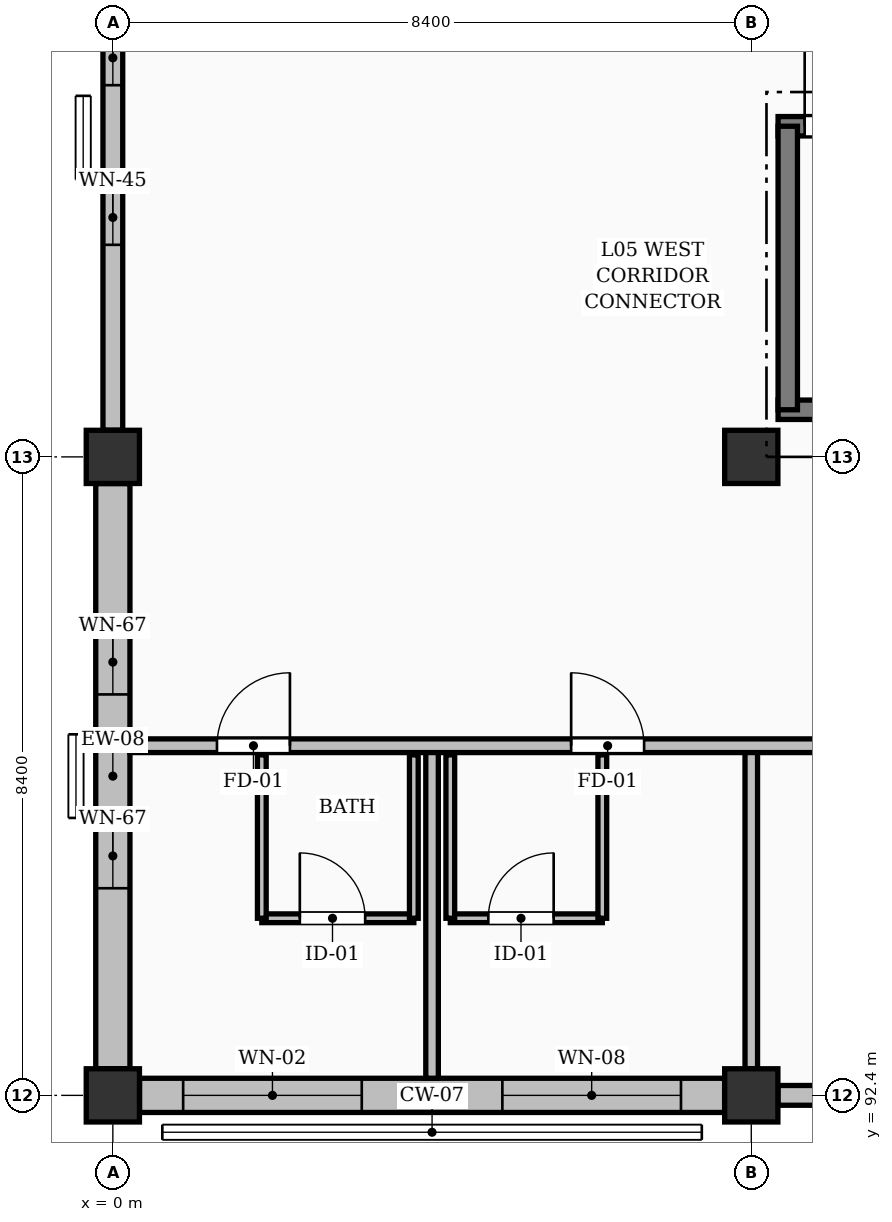
"""IFC4 building model, lengths in metres.
Left out: names, types, materials, properties, quantities, classifications, styles, units other than length and angle.
Written with IfcOpenShell. Run it as: python <this file> out.ifc"""

import sys

from ifc_helpers import new_model, si_unit, direction, frame, frame_2d, origin, origin_2d, place, context, subcontext, project, spatial, rectangle, extrude, element, fill, save


model = new_model("IFC4")
c1 = context("Model", 3, precision=1e-05, world=origin(), true_north=direction((0.0, 1.0)))
c2 = subcontext(c1, "Body", "Model", "MODEL_VIEW")
j1 = project(units=[si_unit("LENGTHUNIT", "METRE"), si_unit("PLANEANGLEUNIT", "RADIAN")], contexts=[c1])
p1 = place(None, origin())
s1 = spatial("IfcSite", under=j1, at=p1, CompositionType="ELEMENT")
p2 = place(p1, origin())
s2 = spatial("IfcBuilding", under=s1, at=p2, CompositionType="ELEMENT")
p3 = place(p2, frame((0.0, 0.0, 18.48)))
s3 = spatial("IfcBuildingStorey", under=s2, at=p3, CompositionType="ELEMENT", Elevation=18.48)
for number, where, z_axis, x_axis in (
    (1, (0.0, 92.4, 0.0), (0.0, 0.0, 1.0), (1.0, 0.0, 0.0)),
    (2, (0.0, 100.8, 0.0), (0.0, 0.0, 1.0), (1.0, 0.0, 0.0)),
    (3, (8.4, 92.4, 0.0), (0.0, 0.0, 1.0), (1.0, 0.0, 0.0)),
    (4, (8.4, 100.8, 0.0), (0.0, 0.0, 1.0), (1.0, 0.0, 0.0)),
):
    element("IfcColumn", number, at=place(p3, frame(where, z_axis=z_axis, x_axis=x_axis)), inside=s3, PredefinedType="COLUMN", context=c2, shape_type="SweptSolid", body=[
        extrude(rectangle(XDim=0.7, YDim=0.7, at=origin_2d()), origin(), (0.0, 0.0, 1.0), 3.36),
    ])
p4 = place(p3, frame((0.351, 92.4, 0.0), z_axis=(0.0, 0.0, 1.0), x_axis=(1.0, 0.0, 0.0)))
e5 = element("IfcWall", 5, at=p4, inside=s3, PredefinedType="SOLIDWALL", context=c2, shape_type="SweptSolid", body=[
    extrude(rectangle(XDim=7.698, YDim=0.45, at=frame_2d((3.849, 0.0))), origin(), (0.0, 0.0, 1.0), 2.494),
])
p5 = place(p4, frame((0.574, 0.0, 0.25)))
e6 = element("IfcOpeningElement", 6, at=p5, cuts=e5, PredefinedType="OPENING", context=c2, shape_type="SweptSolid", body=[
    extrude(rectangle(XDim=2.35, YDim=1.85, at=frame_2d((1.175, 0.925))), frame((0.0, 0.235, 0.0), z_axis=(0.0, -1.0, 0.0), x_axis=(1.0, 0.0, 0.0)), (0.0, 0.0, 1.0), 0.47),
])
p6 = place(p4, frame((4.774, 0.0, 0.25)))
e7 = element("IfcOpeningElement", 7, at=p6, cuts=e5, PredefinedType="OPENING", context=c2, shape_type="SweptSolid", body=[
    extrude(rectangle(XDim=2.35, YDim=1.95, at=frame_2d((1.175, 0.975))), frame((0.0, 0.235, 0.0), z_axis=(0.0, -1.0, 0.0), x_axis=(1.0, 0.0, 0.0)), (0.0, 0.0, 1.0), 0.47),
])
p7 = place(p3, frame((8.751, 92.4, 0.0), z_axis=(0.0, 0.0, 1.0), x_axis=(1.0, 0.0, 0.0)))
e8 = element("IfcWall", 8, at=p7, inside=s3, PredefinedType="SOLIDWALL", context=c2, shape_type="SweptSolid", body=[
    extrude(rectangle(XDim=7.698, YDim=0.26, at=frame_2d((3.849, 0.0))), origin(), (0.0, 0.0, 1.0), 2.494),
])
p8 = place(p7, frame((1.024, 0.0, 0.0)))
e9 = element("IfcOpeningElement", 9, at=p8, cuts=e8, PredefinedType="OPENING", context=c2, shape_type="SweptSolid", body=[
    extrude(rectangle(XDim=1.55, YDim=2.08, at=frame_2d((0.775, 1.04))), frame((0.0, 0.14, 0.0), z_axis=(0.0, -1.0, 0.0), x_axis=(1.0, 0.0, 0.0)), (0.0, 0.0, 1.0), 0.28),
])
p9 = place(p7, frame((4.624, 0.0, 0.25)))
e10 = element("IfcOpeningElement", 10, at=p9, cuts=e8, PredefinedType="OPENING", context=c2, shape_type="SweptSolid", body=[
    extrude(rectangle(XDim=2.35, YDim=1.95, at=frame_2d((1.175, 0.975))), frame((0.0, 0.14, 0.0), z_axis=(0.0, -1.0, 0.0), x_axis=(1.0, 0.0, 0.0)), (0.0, 0.0, 1.0), 0.28),
])
p10 = place(p3, frame((0.0, 92.751, 0.0), z_axis=(0.0, 0.0, 1.0), x_axis=(0.0, 1.0, 0.0)))
e11 = element("IfcWall", 11, at=p10, inside=s3, PredefinedType="SOLIDWALL", context=c2, shape_type="SweptSolid", body=[
    extrude(rectangle(XDim=7.698, YDim=0.45, at=frame_2d((3.849, 0.0))), origin(), (0.0, 0.0, 1.0), 2.494),
])
p11 = place(p10, frame((2.374, 0.0, 0.3)))
e12 = element("IfcOpeningElement", 12, at=p11, cuts=e11, PredefinedType="OPENING", context=c2, shape_type="SweptSolid", body=[
    extrude(rectangle(XDim=0.85, YDim=1.9, at=frame_2d((0.425, 0.95))), frame((0.0, 0.235, 0.0), z_axis=(0.0, -1.0, 0.0), x_axis=(1.0, 0.0, 0.0)), (0.0, 0.0, 1.0), 0.47),
])
p12 = place(p10, frame((4.924, 0.0, 0.3)))
e13 = element("IfcOpeningElement", 13, at=p12, cuts=e11, PredefinedType="OPENING", context=c2, shape_type="SweptSolid", body=[
    extrude(rectangle(XDim=0.85, YDim=1.9, at=frame_2d((0.425, 0.95))), frame((0.0, 0.235, 0.0), z_axis=(0.0, -1.0, 0.0), x_axis=(1.0, 0.0, 0.0)), (0.0, 0.0, 1.0), 0.47),
])
p13 = place(p3, frame((0.0, 101.151, 0.0), z_axis=(0.0, 0.0, 1.0), x_axis=(0.0, 1.0, 0.0)))
e14 = element("IfcWall", 14, at=p13, inside=s3, PredefinedType="SOLIDWALL", context=c2, shape_type="SweptSolid", body=[
    extrude(rectangle(XDim=7.698, YDim=0.26, at=frame_2d((3.849, 0.0))), origin(), (0.0, 0.0, 1.0), 2.494),
])
p14 = place(p13, frame((2.439, 0.0, 0.3)))
e15 = element("IfcOpeningElement", 15, at=p14, cuts=e14, PredefinedType="OPENING", context=c2, shape_type="SweptSolid", body=[
    extrude(rectangle(XDim=0.72, YDim=1.85, at=frame_2d((0.36, 0.925))), frame((0.0, 0.14, 0.0), z_axis=(0.0, -1.0, 0.0), x_axis=(1.0, 0.0, 0.0)), (0.0, 0.0, 1.0), 0.28),
])
p15 = place(p13, frame((4.539, 0.0, 0.3)))
e16 = element("IfcOpeningElement", 16, at=p15, cuts=e14, PredefinedType="OPENING", context=c2, shape_type="SweptSolid", body=[
    extrude(rectangle(XDim=0.72, YDim=1.85, at=frame_2d((0.36, 0.925))), frame((0.0, 0.14, 0.0), z_axis=(0.0, -1.0, 0.0), x_axis=(1.0, 0.0, 0.0)), (0.0, 0.0, 1.0), 0.28),
])
p16 = place(p3, frame((8.752, 101.42, 0.0), z_axis=(0.0, 0.0, 1.0), x_axis=(1.0, 0.0, 0.0)))
e17 = element("IfcWall", 17, at=p16, inside=s3, PredefinedType="SOLIDWALL", context=c2, shape_type="SweptSolid", body=[
    extrude(rectangle(XDim=8.225, YDim=0.255, at=frame_2d((4.113, 0.0))), origin(), (0.0, 0.0, 1.0), 3.12),
])
p17 = place(p3, frame((8.752, 105.15, 0.0), z_axis=(0.0, 0.0, 1.0), x_axis=(1.0, 0.0, 0.0)))
e18 = element("IfcWall", 18, at=p17, inside=s3, PredefinedType="SOLIDWALL", context=c2, shape_type="SweptSolid", body=[
    extrude(rectangle(XDim=8.225, YDim=0.255, at=frame_2d((4.113, 0.0))), origin(), (0.0, 0.0, 1.0), 3.12),
])
p18 = place(p17, frame((0.35, 0.0, 0.0)))
e19 = element("IfcOpeningElement", 19, at=p18, cuts=e18, PredefinedType="OPENING", context=c2, shape_type="SweptSolid", body=[
    extrude(rectangle(XDim=1.16, YDim=2.15, at=frame_2d((0.58, 1.075))), frame((0.0, 0.137, 0.0), z_axis=(0.0, -1.0, 0.0), x_axis=(1.0, 0.0, 0.0)), (0.0, 0.0, 1.0), 0.275),
])
p19 = place(p3, frame((8.88, 101.42, 0.0), z_axis=(0.0, 0.0, 1.0), x_axis=(0.0, 1.0, 0.0)))
e20 = element("IfcWall", 20, at=p19, inside=s3, PredefinedType="SOLIDWALL", context=c2, shape_type="SweptSolid", body=[
    extrude(rectangle(XDim=3.73, YDim=0.255, at=frame_2d((1.865, 0.0))), origin(), (0.0, 0.0, 1.0), 3.12),
])
p20 = place(p3, frame((1.96, 94.73, 0.0), z_axis=(0.0, 0.0, 1.0), x_axis=(1.0, 0.0, 0.0)))
e21 = element("IfcWall", 21, at=p20, inside=s3, PredefinedType="PARTITIONING", context=c2, shape_type="SweptSolid", body=[
    extrude(rectangle(XDim=2.0, YDim=0.115, at=frame_2d((1.0, 0.0))), origin(), (0.0, 0.0, 1.0), 3.12),
])
p21 = place(p20, frame((0.5, 0.0, 0.0)))
e22 = element("IfcOpeningElement", 22, at=p21, cuts=e21, PredefinedType="OPENING", context=c2, shape_type="SweptSolid", body=[
    extrude(rectangle(XDim=0.86, YDim=2.05, at=frame_2d((0.43, 1.025))), frame((0.0, 0.067, 0.0), z_axis=(0.0, -1.0, 0.0), x_axis=(1.0, 0.0, 0.0)), (0.0, 0.0, 1.0), 0.135),
])
p22 = place(p3, frame((1.96, 94.73, 0.0), z_axis=(0.0, 0.0, 1.0), x_axis=(0.0, 1.0, 0.0)))
e23 = element("IfcWall", 23, at=p22, inside=s3, PredefinedType="PARTITIONING", context=c2, shape_type="SweptSolid", body=[
    extrude(rectangle(XDim=2.15, YDim=0.115, at=frame_2d((1.075, 0.0))), origin(), (0.0, 0.0, 1.0), 2.642),
])
p23 = place(p3, frame((3.96, 94.73, 0.0), z_axis=(0.0, 0.0, 1.0), x_axis=(0.0, 1.0, 0.0)))
e24 = element("IfcWall", 24, at=p23, inside=s3, PredefinedType="PARTITIONING", context=c2, shape_type="SweptSolid", body=[
    extrude(rectangle(XDim=2.15, YDim=0.115, at=frame_2d((1.075, 0.0))), origin(), (0.0, 0.0, 1.0), 3.12),
])
p24 = place(p3, frame((4.44, 94.73, 0.0), z_axis=(0.0, 0.0, 1.0), x_axis=(1.0, 0.0, 0.0)))
e25 = element("IfcWall", 25, at=p24, inside=s3, PredefinedType="PARTITIONING", context=c2, shape_type="SweptSolid", body=[
    extrude(rectangle(XDim=2.0, YDim=0.115, at=frame_2d((1.0, 0.0))), origin(), (0.0, 0.0, 1.0), 3.12),
])
p25 = place(p24, frame((0.5, 0.0, 0.0)))
e26 = element("IfcOpeningElement", 26, at=p25, cuts=e25, PredefinedType="OPENING", context=c2, shape_type="SweptSolid", body=[
    extrude(rectangle(XDim=0.86, YDim=2.05, at=frame_2d((0.43, 1.025))), frame((0.0, 0.067, 0.0), z_axis=(0.0, -1.0, 0.0), x_axis=(1.0, 0.0, 0.0)), (0.0, 0.0, 1.0), 0.135),
])
p26 = place(p3, frame((4.44, 94.73, 0.0), z_axis=(0.0, 0.0, 1.0), x_axis=(0.0, 1.0, 0.0)))
e27 = element("IfcWall", 27, at=p26, inside=s3, PredefinedType="PARTITIONING", context=c2, shape_type="SweptSolid", body=[
    extrude(rectangle(XDim=2.15, YDim=0.115, at=frame_2d((1.075, 0.0))), origin(), (0.0, 0.0, 1.0), 3.12),
])
p27 = place(p3, frame((6.44, 94.73, 0.0), z_axis=(0.0, 0.0, 1.0), x_axis=(0.0, 1.0, 0.0)))
e28 = element("IfcWall", 28, at=p27, inside=s3, PredefinedType="PARTITIONING", context=c2, shape_type="SweptSolid", body=[
    extrude(rectangle(XDim=2.15, YDim=0.115, at=frame_2d((1.075, 0.0))), origin(), (0.0, 0.0, 1.0), 2.642),
])
p28 = place(p3, frame((4.2, 92.625, 0.0), z_axis=(0.0, 0.0, 1.0), x_axis=(0.0, 1.0, 0.0)))
e29 = element("IfcWall", 29, at=p28, inside=s3, PredefinedType="PARTITIONING", context=c2, shape_type="SweptSolid", body=[
    extrude(rectangle(XDim=4.375, YDim=0.165, at=frame_2d((2.188, 0.0))), origin(), (0.0, 0.0, 1.0), 3.12),
])
p29 = place(p3, frame((8.4, 92.75, 0.0), z_axis=(0.0, 0.0, 1.0), x_axis=(0.0, 1.0, 0.0)))
e30 = element("IfcWall", 30, at=p29, inside=s3, PredefinedType="PARTITIONING", context=c2, shape_type="SweptSolid", body=[
    extrude(rectangle(XDim=4.25, YDim=0.165, at=frame_2d((2.125, 0.0))), origin(), (0.0, 0.0, 1.0), 2.455),
])
p30 = place(p3, frame((0.225, 97.0, 0.0), z_axis=(0.0, 0.0, 1.0), x_axis=(1.0, 0.0, 0.0)))
e31 = element("IfcWall", 31, at=p30, inside=s3, PredefinedType="PARTITIONING", context=c2, shape_type="SweptSolid", body=[
    extrude(rectangle(XDim=50.175, YDim=0.18, at=frame_2d((25.087, 0.0))), origin(), (0.0, 0.0, 1.0), 3.12),
])
p31 = place(p30, frame((1.145, 0.0, 0.0)))
e32 = element("IfcOpeningElement", 32, at=p31, cuts=e31, PredefinedType="OPENING", context=c2, shape_type="SweptSolid", body=[
    extrude(rectangle(XDim=0.96, YDim=2.15, at=frame_2d((0.48, 1.075))), frame((0.0, 0.1, 0.0), z_axis=(0.0, -1.0, 0.0), x_axis=(1.0, 0.0, 0.0)), (0.0, 0.0, 1.0), 0.2),
])
p32 = place(p30, frame((5.805, 0.0, 0.0)))
e33 = element("IfcOpeningElement", 33, at=p32, cuts=e31, PredefinedType="OPENING", context=c2, shape_type="SweptSolid", body=[
    extrude(rectangle(XDim=0.96, YDim=2.15, at=frame_2d((0.48, 1.075))), frame((0.0, 0.1, 0.0), z_axis=(0.0, -1.0, 0.0), x_axis=(1.0, 0.0, 0.0)), (0.0, 0.0, 1.0), 0.2),
])
p33 = place(p30, frame((9.545, 0.0, 0.0)))
e34 = element("IfcOpeningElement", 34, at=p33, cuts=e31, PredefinedType="OPENING", context=c2, shape_type="SweptSolid", body=[
    extrude(rectangle(XDim=0.96, YDim=2.15, at=frame_2d((0.48, 1.075))), frame((0.0, 0.1, 0.0), z_axis=(0.0, -1.0, 0.0), x_axis=(1.0, 0.0, 0.0)), (0.0, 0.0, 1.0), 0.2),
])
p34 = place(p30, frame((14.205, 0.0, 0.0)))
e35 = element("IfcOpeningElement", 35, at=p34, cuts=e31, PredefinedType="OPENING", context=c2, shape_type="SweptSolid", body=[
    extrude(rectangle(XDim=0.96, YDim=2.15, at=frame_2d((0.48, 1.075))), frame((0.0, 0.1, 0.0), z_axis=(0.0, -1.0, 0.0), x_axis=(1.0, 0.0, 0.0)), (0.0, 0.0, 1.0), 0.2),
])
p35 = place(p30, frame((17.945, 0.0, 0.0)))
e36 = element("IfcOpeningElement", 36, at=p35, cuts=e31, PredefinedType="OPENING", context=c2, shape_type="SweptSolid", body=[
    extrude(rectangle(XDim=0.96, YDim=2.15, at=frame_2d((0.48, 1.075))), frame((0.0, 0.1, 0.0), z_axis=(0.0, -1.0, 0.0), x_axis=(1.0, 0.0, 0.0)), (0.0, 0.0, 1.0), 0.2),
])
p36 = place(p30, frame((22.605, 0.0, 0.0)))
e37 = element("IfcOpeningElement", 37, at=p36, cuts=e31, PredefinedType="OPENING", context=c2, shape_type="SweptSolid", body=[
    extrude(rectangle(XDim=0.96, YDim=2.15, at=frame_2d((0.48, 1.075))), frame((0.0, 0.1, 0.0), z_axis=(0.0, -1.0, 0.0), x_axis=(1.0, 0.0, 0.0)), (0.0, 0.0, 1.0), 0.2),
])
p37 = place(p30, frame((26.345, 0.0, 0.0)))
e38 = element("IfcOpeningElement", 38, at=p37, cuts=e31, PredefinedType="OPENING", context=c2, shape_type="SweptSolid", body=[
    extrude(rectangle(XDim=0.96, YDim=2.15, at=frame_2d((0.48, 1.075))), frame((0.0, 0.1, 0.0), z_axis=(0.0, -1.0, 0.0), x_axis=(1.0, 0.0, 0.0)), (0.0, 0.0, 1.0), 0.2),
])
p38 = place(p30, frame((31.005, 0.0, 0.0)))
e39 = element("IfcOpeningElement", 39, at=p38, cuts=e31, PredefinedType="OPENING", context=c2, shape_type="SweptSolid", body=[
    extrude(rectangle(XDim=0.96, YDim=2.15, at=frame_2d((0.48, 1.075))), frame((0.0, 0.1, 0.0), z_axis=(0.0, -1.0, 0.0), x_axis=(1.0, 0.0, 0.0)), (0.0, 0.0, 1.0), 0.2),
])
p39 = place(p30, frame((34.745, 0.0, 0.0)))
e40 = element("IfcOpeningElement", 40, at=p39, cuts=e31, PredefinedType="OPENING", context=c2, shape_type="SweptSolid", body=[
    extrude(rectangle(XDim=0.96, YDim=2.15, at=frame_2d((0.48, 1.075))), frame((0.0, 0.1, 0.0), z_axis=(0.0, -1.0, 0.0), x_axis=(1.0, 0.0, 0.0)), (0.0, 0.0, 1.0), 0.2),
])
p40 = place(p30, frame((39.405, 0.0, 0.0)))
e41 = element("IfcOpeningElement", 41, at=p40, cuts=e31, PredefinedType="OPENING", context=c2, shape_type="SweptSolid", body=[
    extrude(rectangle(XDim=0.96, YDim=2.15, at=frame_2d((0.48, 1.075))), frame((0.0, 0.1, 0.0), z_axis=(0.0, -1.0, 0.0), x_axis=(1.0, 0.0, 0.0)), (0.0, 0.0, 1.0), 0.2),
])
p41 = place(p30, frame((45.175, 0.0, 0.0)))
e42 = element("IfcOpeningElement", 42, at=p41, cuts=e31, PredefinedType="OPENING", context=c2, shape_type="SweptSolid", body=[
    extrude(rectangle(XDim=1.62, YDim=2.2, at=frame_2d((0.81, 1.1))), frame((0.0, 0.1, 0.0), z_axis=(0.0, -1.0, 0.0), x_axis=(1.0, 0.0, 0.0)), (0.0, 0.0, 1.0), 0.2),
])
p42 = place(p5, origin())
e43 = element("IfcWindow", 43, at=p42, inside=s3, PartitioningType="DOUBLE_PANEL_VERTICAL", PredefinedType="WINDOW", context=c2, shape_type="SweptSolid", body=[
    extrude(rectangle(XDim=2.35, YDim=1.85, at=frame_2d((1.175, 0.925))), frame((0.0, 0.03, 0.0), z_axis=(0.0, -1.0, 0.0), x_axis=(1.0, 0.0, 0.0)), (0.0, 0.0, 1.0), 0.06),
])
fill(e6, e43)
p43 = place(p6, origin())
e44 = element("IfcWindow", 44, at=p43, inside=s3, PartitioningType="DOUBLE_PANEL_VERTICAL", PredefinedType="WINDOW", context=c2, shape_type="SweptSolid", body=[
    extrude(rectangle(XDim=2.35, YDim=1.95, at=frame_2d((1.175, 0.975))), frame((0.0, 0.03, 0.0), z_axis=(0.0, -1.0, 0.0), x_axis=(1.0, 0.0, 0.0)), (0.0, 0.0, 1.0), 0.06),
])
fill(e7, e44)
p44 = place(p11, origin())
e45 = element("IfcWindow", 45, at=p44, inside=s3, PartitioningType="SINGLE_PANEL", PredefinedType="WINDOW", context=c2, shape_type="SweptSolid", body=[
    extrude(rectangle(XDim=0.85, YDim=1.9, at=frame_2d((0.425, 0.95))), frame((0.0, 0.03, 0.0), z_axis=(0.0, -1.0, 0.0), x_axis=(1.0, 0.0, 0.0)), (0.0, 0.0, 1.0), 0.06),
])
fill(e12, e45)
p45 = place(p12, origin())
e46 = element("IfcWindow", 46, at=p45, inside=s3, PartitioningType="SINGLE_PANEL", PredefinedType="WINDOW", context=c2, shape_type="SweptSolid", body=[
    extrude(rectangle(XDim=0.85, YDim=1.9, at=frame_2d((0.425, 0.95))), frame((0.0, 0.03, 0.0), z_axis=(0.0, -1.0, 0.0), x_axis=(1.0, 0.0, 0.0)), (0.0, 0.0, 1.0), 0.06),
])
fill(e13, e46)
p46 = place(p14, origin())
e47 = element("IfcWindow", 47, at=p46, inside=s3, PartitioningType="SINGLE_PANEL", PredefinedType="WINDOW", context=c2, shape_type="SweptSolid", body=[
    extrude(rectangle(XDim=0.72, YDim=1.85, at=frame_2d((0.36, 0.925))), frame((0.0, 0.03, 0.0), z_axis=(0.0, -1.0, 0.0), x_axis=(1.0, 0.0, 0.0)), (0.0, 0.0, 1.0), 0.06),
])
fill(e15, e47)
p47 = place(p15, origin())
e48 = element("IfcWindow", 48, at=p47, inside=s3, PartitioningType="SINGLE_PANEL", PredefinedType="WINDOW", context=c2, shape_type="SweptSolid", body=[
    extrude(rectangle(XDim=0.72, YDim=1.85, at=frame_2d((0.36, 0.925))), frame((0.0, 0.03, 0.0), z_axis=(0.0, -1.0, 0.0), x_axis=(1.0, 0.0, 0.0)), (0.0, 0.0, 1.0), 0.06),
])
fill(e16, e48)
p48 = place(p18, origin())
e49 = element("IfcDoor", 49, at=p48, inside=s3, OperationType="SINGLE_SWING_LEFT", PredefinedType="DOOR", context=c2, shape_type="SweptSolid", body=[
    extrude(rectangle(XDim=1.16, YDim=2.15, at=frame_2d((0.58, 1.075))), frame((0.0, 0.025, 0.0), z_axis=(0.0, -1.0, 0.0), x_axis=(1.0, 0.0, 0.0)), (0.0, 0.0, 1.0), 0.05),
])
fill(e19, e49)
p49 = place(p21, origin())
e50 = element("IfcDoor", 50, at=p49, inside=s3, OperationType="SINGLE_SWING_LEFT", PredefinedType="DOOR", context=c2, shape_type="SweptSolid", body=[
    extrude(rectangle(XDim=0.86, YDim=2.05, at=frame_2d((0.43, 1.025))), frame((0.0, 0.025, 0.0), z_axis=(0.0, -1.0, 0.0), x_axis=(1.0, 0.0, 0.0)), (0.0, 0.0, 1.0), 0.05),
])
fill(e22, e50)
p50 = place(p25, origin())
e51 = element("IfcDoor", 51, at=p50, inside=s3, OperationType="SINGLE_SWING_RIGHT", PredefinedType="DOOR", context=c2, shape_type="SweptSolid", body=[
    extrude(rectangle(XDim=0.86, YDim=2.05, at=frame_2d((0.43, 1.025))), frame((0.0, 0.025, 0.0), z_axis=(0.0, -1.0, 0.0), x_axis=(1.0, 0.0, 0.0)), (0.0, 0.0, 1.0), 0.05),
])
fill(e26, e51)
p51 = place(p31, origin())
e52 = element("IfcDoor", 52, at=p51, inside=s3, OperationType="SINGLE_SWING_RIGHT", PredefinedType="DOOR", context=c2, shape_type="SweptSolid", body=[
    extrude(rectangle(XDim=0.96, YDim=2.15, at=frame_2d((0.48, 1.075))), frame((0.0, 0.025, 0.0), z_axis=(0.0, -1.0, 0.0), x_axis=(1.0, 0.0, 0.0)), (0.0, 0.0, 1.0), 0.05),
])
fill(e32, e52)
p52 = place(p32, origin())
e53 = element("IfcDoor", 53, at=p52, inside=s3, OperationType="SINGLE_SWING_LEFT", PredefinedType="DOOR", context=c2, shape_type="SweptSolid", body=[
    extrude(rectangle(XDim=0.96, YDim=2.15, at=frame_2d((0.48, 1.075))), frame((0.0, 0.025, 0.0), z_axis=(0.0, -1.0, 0.0), x_axis=(1.0, 0.0, 0.0)), (0.0, 0.0, 1.0), 0.05),
])
fill(e33, e53)
save(model, sys.argv[1])
